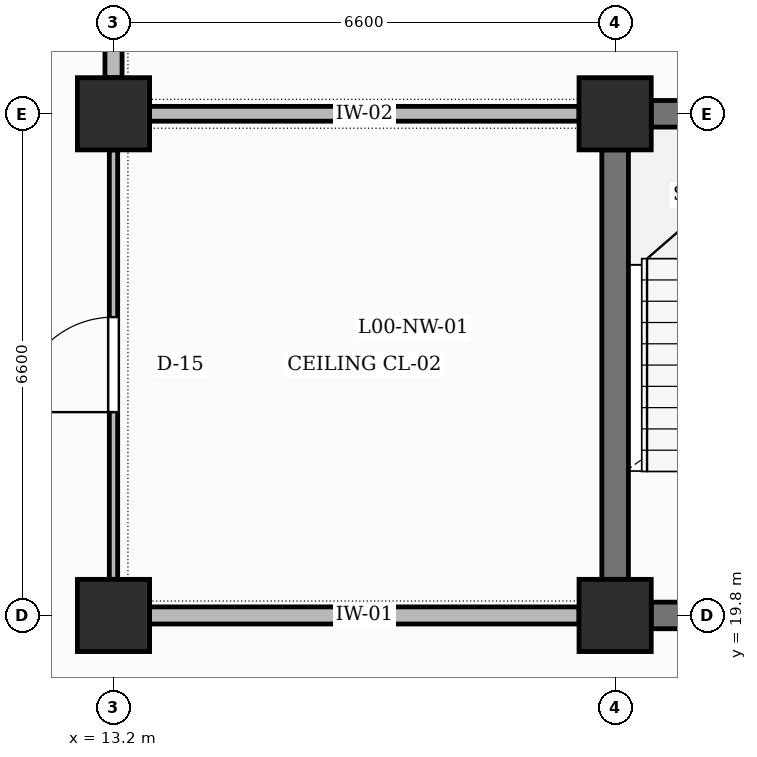
"""IFC4 building model, lengths in metres.
Left out: names, types, materials, properties, quantities, classifications, styles, units other than length and angle.
Written with IfcOpenShell. Run it as: python <this file> out.ifc"""

import sys

from ifc_helpers import new_model, si_unit, direction, frame, frame_2d, origin, origin_2d, place, context, subcontext, project, spatial, rectangle, extrude, element, fill, save


model = new_model("IFC4")
c1 = context("Model", 3, precision=1e-05, world=origin(), true_north=direction((0.0, 1.0)))
c2 = subcontext(c1, "Body", "Model", "MODEL_VIEW")
j1 = project(units=[si_unit("LENGTHUNIT", "METRE"), si_unit("PLANEANGLEUNIT", "RADIAN")], contexts=[c1])
p1 = place(None, origin())
s1 = spatial("IfcSite", under=j1, at=p1, CompositionType="ELEMENT")
p2 = place(p1, origin())
s2 = spatial("IfcBuilding", under=s1, at=p2, CompositionType="ELEMENT")
p3 = place(p2, origin())
s3 = spatial("IfcBuildingStorey", under=s2, at=p3, CompositionType="ELEMENT", Elevation=0.0)
for number, where, z_axis, x_axis in (
    (1, (13.2, 19.8, 0.0), (0.0, 0.0, 1.0), (1.0, 0.0, 0.0)),
    (2, (13.2, 26.4, 0.0), (0.0, 0.0, 1.0), (1.0, 0.0, 0.0)),
    (3, (19.8, 19.8, 0.0), (0.0, 0.0, 1.0), (1.0, 0.0, 0.0)),
    (4, (19.8, 26.4, 0.0), (0.0, 0.0, 1.0), (1.0, 0.0, 0.0)),
):
    element("IfcColumn", number, at=place(p3, frame(where, z_axis=z_axis, x_axis=x_axis)), inside=s3, PredefinedType="COLUMN", context=c2, shape_type="SweptSolid", body=[
        extrude(rectangle(XDim=0.95, YDim=0.95, at=origin_2d()), origin(), (0.0, 0.0, 1.0), 5.4),
    ])
p4 = place(p3, frame((20.275, 19.8, 0.0), z_axis=(0.0, 0.0, 1.0), x_axis=(1.0, 0.0, 0.0)))
e5 = element("IfcWall", 5, at=p4, inside=s3, PredefinedType="SHEAR", context=c2, shape_type="SweptSolid", body=[
    extrude(rectangle(XDim=5.65, YDim=0.35, at=frame_2d((2.825, 0.0))), origin(), (0.0, 0.0, 1.0), 4.2),
])
p5 = place(p4, frame((2.25, 0.0, 0.0)))
e6 = element("IfcOpeningElement", 6, at=p5, cuts=e5, PredefinedType="OPENING", context=c2, shape_type="SweptSolid", body=[
    extrude(rectangle(XDim=1.15, YDim=2.2, at=frame_2d((0.575, 1.1))), frame((0.0, 0.185, 0.0), z_axis=(0.0, -1.0, 0.0), x_axis=(1.0, 0.0, 0.0)), (0.0, 0.0, 1.0), 0.37),
])
p6 = place(p3, frame((20.275, 26.4, 0.0), z_axis=(0.0, 0.0, 1.0), x_axis=(1.0, 0.0, 0.0)))
e7 = element("IfcWall", 7, at=p6, inside=s3, PredefinedType="SHEAR", context=c2, shape_type="SweptSolid", body=[
    extrude(rectangle(XDim=5.675, YDim=0.35, at=frame_2d((2.837, 0.0))), origin(), (0.0, 0.0, 1.0), 4.3),
])
p7 = place(p3, frame((19.8, 20.275, 0.0), z_axis=(0.0, 0.0, 1.0), x_axis=(0.0, 1.0, 0.0)))
e8 = element("IfcWall", 8, at=p7, inside=s3, PredefinedType="SHEAR", context=c2, shape_type="SweptSolid", body=[
    extrude(rectangle(XDim=5.65, YDim=0.35, at=frame_2d((2.825, 0.0))), origin(), (0.0, 0.0, 1.0), 4.3),
])
p8 = place(p3, frame((13.2, 20.275, 0.0), z_axis=(0.0, 0.0, 1.0), x_axis=(0.0, 1.0, 0.0)))
e9 = element("IfcWall", 9, at=p8, inside=s3, PredefinedType="PARTITIONING", context=c2, shape_type="SweptSolid", body=[
    extrude(rectangle(XDim=5.65, YDim=0.11, at=frame_2d((2.825, 0.0))), origin(), (0.0, 0.0, 1.0), 4.3),
])
p9 = place(p8, frame((2.2, 0.0, 0.0)))
e10 = element("IfcOpeningElement", 10, at=p9, cuts=e9, PredefinedType="OPENING", context=c2, shape_type="SweptSolid", body=[
    extrude(rectangle(XDim=1.25, YDim=2.25, at=frame_2d((0.625, 1.125))), frame((0.0, 0.065, 0.0), z_axis=(0.0, -1.0, 0.0), x_axis=(1.0, 0.0, 0.0)), (0.0, 0.0, 1.0), 0.13),
])
p10 = place(p3, frame((13.2, 26.875, 0.0), z_axis=(0.0, 0.0, 1.0), x_axis=(0.0, 1.0, 0.0)))
e11 = element("IfcWall", 11, at=p10, inside=s3, PredefinedType="PARTITIONING", context=c2, shape_type="SweptSolid", body=[
    extrude(rectangle(XDim=5.65, YDim=0.225, at=frame_2d((2.825, 0.0))), origin(), (0.0, 0.0, 1.0), 4.3),
])
p11 = place(p10, frame((2.3, 0.0, 0.0)))
e12 = element("IfcOpeningElement", 12, at=p11, cuts=e11, PredefinedType="OPENING", context=c2, shape_type="SweptSolid", body=[
    extrude(rectangle(XDim=1.05, YDim=2.15, at=frame_2d((0.525, 1.075))), frame((0.0, 0.123, 0.0), z_axis=(0.0, -1.0, 0.0), x_axis=(1.0, 0.0, 0.0)), (0.0, 0.0, 1.0), 0.245),
])
p12 = place(p3, frame((13.675, 19.8, 0.0), z_axis=(0.0, 0.0, 1.0), x_axis=(1.0, 0.0, 0.0)))
e13 = element("IfcWall", 13, at=p12, inside=s3, PredefinedType="PARTITIONING", context=c2, shape_type="SweptSolid", body=[
    extrude(rectangle(XDim=5.65, YDim=0.225, at=frame_2d((2.825, 0.0))), origin(), (0.0, 0.0, 1.0), 4.3),
])
p13 = place(p3, frame((13.675, 26.4, 0.0), z_axis=(0.0, 0.0, 1.0), x_axis=(1.0, 0.0, 0.0)))
e14 = element("IfcWall", 14, at=p13, inside=s3, PredefinedType="PARTITIONING", context=c2, shape_type="SweptSolid", body=[
    extrude(rectangle(XDim=5.65, YDim=0.195, at=frame_2d((2.825, 0.0))), origin(), (0.0, 0.0, 1.0), 4.2),
])
p14 = place(p9, origin())
e15 = element("IfcDoor", 15, at=p14, inside=s3, OperationType="SINGLE_SWING_LEFT", PredefinedType="DOOR", context=c2, shape_type="SweptSolid", body=[
    extrude(rectangle(XDim=1.25, YDim=2.25, at=frame_2d((0.625, 1.125))), frame((0.0, 0.025, 0.0), z_axis=(0.0, -1.0, 0.0), x_axis=(1.0, 0.0, 0.0)), (0.0, 0.0, 1.0), 0.05),
])
fill(e10, e15)
save(model, sys.argv[1])
